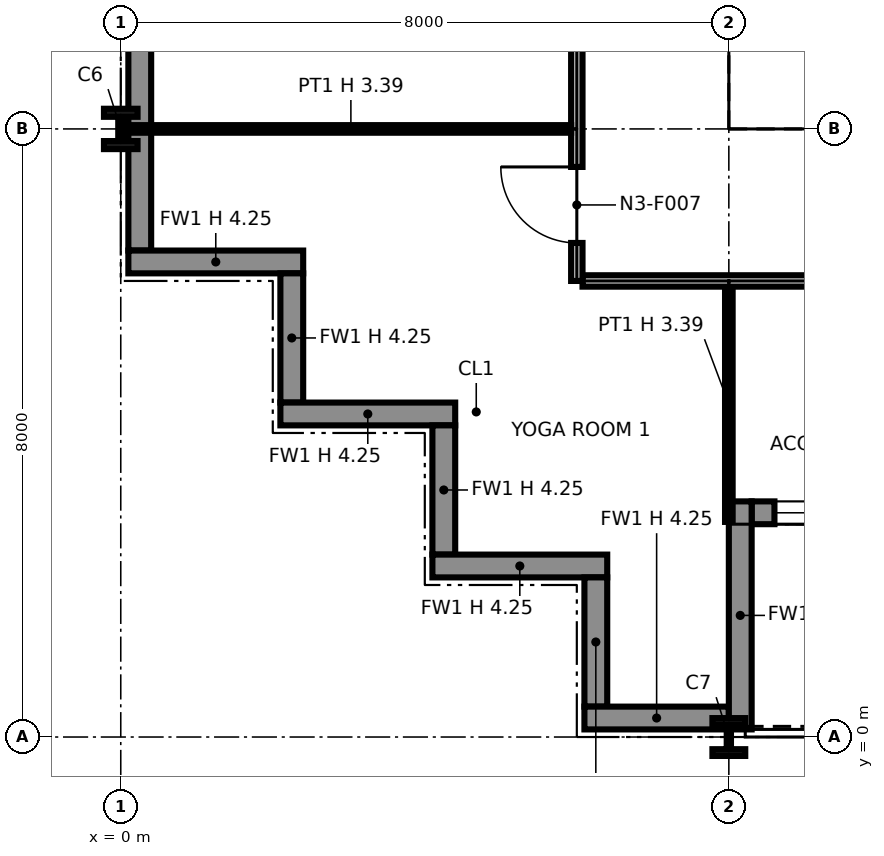
"""IFC4 building model, lengths in metres.
Left out: names, types, materials, properties, quantities, classifications, styles, units other than length and angle.
Written with IfcOpenShell. Run it as: python <this file> out.ifc"""

import sys

from ifc_helpers import new_model, si_unit, direction, frame, frame_2d, origin, origin_2d, place, context, subcontext, project, spatial, polyline, rectangle, i_section, outline, extrude, element, fill, save


model = new_model("IFC4")
c1 = context("Model", 3, precision=1e-05, world=origin(), true_north=direction((0.0, 1.0)))
c2 = subcontext(c1, "Body", "Model", "MODEL_VIEW")
j1 = project(units=[si_unit("LENGTHUNIT", "METRE"), si_unit("PLANEANGLEUNIT", "RADIAN")], contexts=[c1])
p1 = place(None, origin())
s1 = spatial("IfcSite", under=j1, at=p1, CompositionType="ELEMENT")
p2 = place(p1, origin())
s2 = spatial("IfcBuilding", under=s1, at=p2, CompositionType="ELEMENT")
p3 = place(p2, frame((0.0, 0.0, 61.2)))
s3 = spatial("IfcBuildingStorey", under=s2, at=p3, CompositionType="ELEMENT", Elevation=61.2)
p4 = place(p3, frame((0.0, 8.0, 0.0), z_axis=(0.0, 0.0, 1.0), x_axis=(1.0, 0.0, 0.0)))
e1 = element("IfcColumn", 1, at=p4, inside=s3, PredefinedType="COLUMN", context=c2, shape_type="SweptSolid", body=[
    extrude(i_section(OverallWidth=0.442, OverallDepth=0.531, WebThickness=0.066, FlangeThickness=0.106, at=origin_2d()), origin(), (0.0, 0.0, 1.0), 4.25),
])
p5 = place(p3, frame((8.0, 0.0, 0.0), z_axis=(0.0, 0.0, 1.0), x_axis=(1.0, 0.0, 0.0)))
e2 = element("IfcColumn", 2, at=p5, inside=s3, PredefinedType="COLUMN", context=c2, shape_type="SweptSolid", body=[
    extrude(i_section(OverallWidth=0.432, OverallDepth=0.498, WebThickness=0.056, FlangeThickness=0.089, at=origin_2d()), origin(), (0.0, 0.0, 1.0), 4.25),
])
p6 = place(p3, frame((8.0, 8.0, 0.0), z_axis=(0.0, 0.0, 1.0), x_axis=(1.0, 0.0, 0.0)))
e3 = element("IfcColumn", 3, at=p6, inside=s3, PredefinedType="COLUMN", context=c2, shape_type="SweptSolid", body=[
    extrude(i_section(OverallWidth=0.419, OverallDepth=0.455, WebThickness=0.042, FlangeThickness=0.068, at=origin_2d()), origin(), (0.0, 0.0, 1.0), 4.25),
])
p7 = place(p3, frame((0.25, 16.0, 0.0), z_axis=(0.0, 0.0, 1.0), x_axis=(0.0, -1.0, 0.0)))
e4 = element("IfcWall", 4, at=p7, inside=s3, PredefinedType="SOLIDWALL", context=c2, shape_type="SweptSolid", body=[
    extrude(rectangle(XDim=9.6, YDim=0.3, at=frame_2d((4.8, 0.0))), origin(), (0.0, 0.0, 1.0), 4.25),
])
p8 = place(p3, frame((0.1, 6.25, 0.0), z_axis=(0.0, 0.0, 1.0), x_axis=(1.0, 0.0, 0.0)))
e5 = element("IfcWall", 5, at=p8, inside=s3, PredefinedType="SOLIDWALL", context=c2, shape_type="SweptSolid", body=[
    extrude(rectangle(XDim=2.3, YDim=0.3, at=frame_2d((1.15, 0.0))), origin(), (0.0, 0.0, 1.0), 4.25),
])
p9 = place(p3, frame((2.25, 6.1, 0.0), z_axis=(0.0, 0.0, 1.0), x_axis=(0.0, -1.0, 0.0)))
e6 = element("IfcWall", 6, at=p9, inside=s3, PredefinedType="SOLIDWALL", context=c2, shape_type="SweptSolid", body=[
    extrude(rectangle(XDim=1.7, YDim=0.3, at=frame_2d((0.85, 0.0))), origin(), (0.0, 0.0, 1.0), 4.25),
])
p10 = place(p3, frame((2.1, 4.25, 0.0), z_axis=(0.0, 0.0, 1.0), x_axis=(1.0, 0.0, 0.0)))
e7 = element("IfcWall", 7, at=p10, inside=s3, PredefinedType="SOLIDWALL", context=c2, shape_type="SweptSolid", body=[
    extrude(rectangle(XDim=2.3, YDim=0.3, at=frame_2d((1.15, 0.0))), origin(), (0.0, 0.0, 1.0), 4.25),
])
p11 = place(p3, frame((4.25, 4.1, 0.0), z_axis=(0.0, 0.0, 1.0), x_axis=(0.0, -1.0, 0.0)))
e8 = element("IfcWall", 8, at=p11, inside=s3, PredefinedType="SOLIDWALL", context=c2, shape_type="SweptSolid", body=[
    extrude(rectangle(XDim=1.7, YDim=0.3, at=frame_2d((0.85, 0.0))), origin(), (0.0, 0.0, 1.0), 4.25),
])
p12 = place(p3, frame((4.1, 2.25, 0.0), z_axis=(0.0, 0.0, 1.0), x_axis=(1.0, 0.0, 0.0)))
e9 = element("IfcWall", 9, at=p12, inside=s3, PredefinedType="SOLIDWALL", context=c2, shape_type="SweptSolid", body=[
    extrude(rectangle(XDim=2.3, YDim=0.3, at=frame_2d((1.15, 0.0))), origin(), (0.0, 0.0, 1.0), 4.25),
])
p13 = place(p3, frame((6.25, 2.1, 0.0), z_axis=(0.0, 0.0, 1.0), x_axis=(0.0, -1.0, 0.0)))
e10 = element("IfcWall", 10, at=p13, inside=s3, PredefinedType="SOLIDWALL", context=c2, shape_type="SweptSolid", body=[
    extrude(rectangle(XDim=1.7, YDim=0.3, at=frame_2d((0.85, 0.0))), origin(), (0.0, 0.0, 1.0), 4.25),
])
p14 = place(p3, frame((6.1, 0.25, 0.0), z_axis=(0.0, 0.0, 1.0), x_axis=(1.0, 0.0, 0.0)))
e11 = element("IfcWall", 11, at=p14, inside=s3, PredefinedType="SOLIDWALL", context=c2, shape_type="SweptSolid", body=[
    extrude(rectangle(XDim=1.9, YDim=0.3, at=frame_2d((0.95, 0.0))), origin(), (0.0, 0.0, 1.0), 4.25),
])
p15 = place(p3, frame((8.3, 2.95, 0.0), z_axis=(0.0, 0.0, 1.0), x_axis=(1.0, 0.0, 0.0)))
e12 = element("IfcWall", 12, at=p15, inside=s3, PredefinedType="SOLIDWALL", context=c2, shape_type="SweptSolid", body=[
    extrude(rectangle(XDim=7.4, YDim=0.3, at=frame_2d((3.7, 0.0))), origin(), (0.0, 0.0, 1.0), 4.25),
])
p16 = place(p15, frame((0.3, 0.0, 0.9)))
e13 = element("IfcOpeningElement", 13, at=p16, cuts=e12, PredefinedType="OPENING", context=c2, shape_type="SweptSolid", body=[
    extrude(rectangle(XDim=2.8, YDim=2.2, at=frame_2d((1.4, 1.1))), frame((0.0, 0.16, 0.0), z_axis=(0.0, -1.0, 0.0), x_axis=(1.0, 0.0, 0.0)), (0.0, 0.0, 1.0), 0.32),
])
p17 = place(p15, frame((4.7, 0.0, 0.0)))
e14 = element("IfcOpeningElement", 14, at=p17, cuts=e12, PredefinedType="OPENING", context=c2, shape_type="SweptSolid", body=[
    extrude(rectangle(XDim=2.0, YDim=2.4, at=frame_2d((1.0, 1.2))), frame((0.0, 0.16, 0.0), z_axis=(0.0, -1.0, 0.0), x_axis=(1.0, 0.0, 0.0)), (0.0, 0.0, 1.0), 0.32),
])
p18 = place(p3, frame((8.15, 0.1, 0.0), z_axis=(0.0, 0.0, 1.0), x_axis=(0.0, 1.0, 0.0)))
e15 = element("IfcWall", 15, at=p18, inside=s3, PredefinedType="SOLIDWALL", context=c2, shape_type="SweptSolid", body=[
    extrude(rectangle(XDim=3.0, YDim=0.3, at=frame_2d((1.5, 0.0))), origin(), (0.0, 0.0, 1.0), 3.469),
])
p19 = place(p3, frame((8.65, 8.75, 0.0), z_axis=(0.0, 0.0, 1.0), x_axis=(1.0, 0.0, 0.0)))
e16 = element("IfcWall", 16, at=p19, inside=s3, PredefinedType="PARTITIONING", context=c2, shape_type="SweptSolid", body=[
    extrude(outline(polyline([(0.0, 0.0), (14.7, 0.0), (14.7, 4.25), (7.469, 4.25), (7.469, 3.632), (7.231, 3.632), (7.23, 4.25), (0.0, 4.25), (0.0, 0.0)])), frame((0.0, 0.1, 0.0), z_axis=(0.0, -1.0, 0.0), x_axis=(1.0, 0.0, 0.0)), (0.0, 0.0, 1.0), 0.2),
])
p20 = place(p19, frame((1.3, 0.0, 0.0)))
e17 = element("IfcOpeningElement", 17, at=p20, cuts=e16, PredefinedType="OPENING", context=c2, shape_type="SweptSolid", body=[
    extrude(rectangle(XDim=1.4, YDim=2.1, at=frame_2d((0.7, 1.05))), frame((0.0, 0.11, 0.0), z_axis=(0.0, -1.0, 0.0), x_axis=(1.0, 0.0, 0.0)), (0.0, 0.0, 1.0), 0.22),
])
p21 = place(p19, frame((4.6, 0.0, 0.0)))
e18 = element("IfcOpeningElement", 18, at=p21, cuts=e16, PredefinedType="OPENING", context=c2, shape_type="SweptSolid", body=[
    extrude(rectangle(XDim=1.4, YDim=2.1, at=frame_2d((0.7, 1.05))), frame((0.0, 0.11, 0.0), z_axis=(0.0, -1.0, 0.0), x_axis=(1.0, 0.0, 0.0)), (0.0, 0.0, 1.0), 0.22),
])
p22 = place(p19, frame((10.4, 0.0, 0.0)))
e19 = element("IfcOpeningElement", 19, at=p22, cuts=e16, PredefinedType="OPENING", context=c2, shape_type="SweptSolid", body=[
    extrude(rectangle(XDim=1.2, YDim=2.1, at=frame_2d((0.6, 1.05))), frame((0.0, 0.11, 0.0), z_axis=(0.0, -1.0, 0.0), x_axis=(1.0, 0.0, 0.0)), (0.0, 0.0, 1.0), 0.22),
])
p23 = place(p3, frame((8.75, 8.85, 0.0), z_axis=(0.0, 0.0, 1.0), x_axis=(0.0, 1.0, 0.0)))
e20 = element("IfcWall", 20, at=p23, inside=s3, PredefinedType="PARTITIONING", context=c2, shape_type="SweptSolid", body=[
    extrude(outline(polyline([(0.0, 0.0), (14.3, 0.0), (14.3, 4.25), (10.231, 4.25), (10.23, 3.789), (10.07, 3.789), (10.069, 4.25), (7.27, 4.25), (7.269, 3.632), (7.031, 3.632), (7.031, 4.25), (0.0, 4.25), (0.0, 0.0)])), frame((0.0, 0.1, 0.0), z_axis=(0.0, -1.0, 0.0), x_axis=(1.0, 0.0, 0.0)), (0.0, 0.0, 1.0), 0.2),
])
p24 = place(p23, frame((8.3, 0.0, 0.0)))
e21 = element("IfcOpeningElement", 21, at=p24, cuts=e20, PredefinedType="OPENING", context=c2, shape_type="SweptSolid", body=[
    extrude(rectangle(XDim=1.8, YDim=2.1, at=frame_2d((0.9, 1.05))), frame((0.0, 0.11, 0.0), z_axis=(0.0, -1.0, 0.0), x_axis=(1.0, 0.0, 0.0)), (0.0, 0.0, 1.0), 0.22),
])
p25 = place(p3, frame((8.0, 2.83, 0.0), z_axis=(0.0, 0.0, 1.0), x_axis=(0.0, 1.0, 0.0)))
e22 = element("IfcWall", 22, at=p25, inside=s3, PredefinedType="PARTITIONING", context=c2, shape_type="SweptSolid", body=[
    extrude(rectangle(XDim=3.095, YDim=0.1, at=frame_2d((1.547, 0.0))), origin(), (0.0, 0.0, 1.0), 3.391),
])
p26 = place(p3, frame((6.075, 6.0, 0.0), z_axis=(0.0, 0.0, 1.0), x_axis=(1.0, 0.0, 0.0)))
e23 = element("IfcWall", 23, at=p26, inside=s3, PredefinedType="PARTITIONING", context=c2, shape_type="SweptSolid", body=[
    extrude(rectangle(XDim=19.85, YDim=0.15, at=frame_2d((9.925, 0.0))), origin(), (0.0, 0.0, 1.0), 4.25),
])
p27 = place(p26, frame((12.425, 0.0, 0.0), z_axis=(0.0, 0.0, 1.0), x_axis=(-1.0, 0.0, 0.0)))
e24 = element("IfcOpeningElement", 24, at=p27, cuts=e23, PredefinedType="OPENING", context=c2, shape_type="SweptSolid", body=[
    extrude(rectangle(XDim=1.0, YDim=2.1, at=frame_2d((0.5, 1.05))), frame((0.0, 0.085, 0.0), z_axis=(0.0, -1.0, 0.0), x_axis=(1.0, 0.0, 0.0)), (0.0, 0.0, 1.0), 0.17),
])
p28 = place(p26, frame((16.425, 0.0, 0.0), z_axis=(0.0, 0.0, 1.0), x_axis=(-1.0, 0.0, 0.0)))
e25 = element("IfcOpeningElement", 25, at=p28, cuts=e23, PredefinedType="OPENING", context=c2, shape_type="SweptSolid", body=[
    extrude(rectangle(XDim=1.0, YDim=2.1, at=frame_2d((0.5, 1.05))), frame((0.0, 0.085, 0.0), z_axis=(0.0, -1.0, 0.0), x_axis=(1.0, 0.0, 0.0)), (0.0, 0.0, 1.0), 0.17),
])
p29 = place(p26, frame((4.425, 0.0, 0.0), z_axis=(0.0, 0.0, 1.0), x_axis=(-1.0, 0.0, 0.0)))
e26 = element("IfcOpeningElement", 26, at=p29, cuts=e23, PredefinedType="OPENING", context=c2, shape_type="SweptSolid", body=[
    extrude(rectangle(XDim=1.0, YDim=2.1, at=frame_2d((0.5, 1.05))), frame((0.0, 0.085, 0.0), z_axis=(0.0, -1.0, 0.0), x_axis=(1.0, 0.0, 0.0)), (0.0, 0.0, 1.0), 0.17),
])
p30 = place(p26, frame((8.425, 0.0, 0.0), z_axis=(0.0, 0.0, 1.0), x_axis=(-1.0, 0.0, 0.0)))
e27 = element("IfcOpeningElement", 27, at=p30, cuts=e23, PredefinedType="OPENING", context=c2, shape_type="SweptSolid", body=[
    extrude(rectangle(XDim=1.0, YDim=2.1, at=frame_2d((0.5, 1.05))), frame((0.0, 0.085, 0.0), z_axis=(0.0, -1.0, 0.0), x_axis=(1.0, 0.0, 0.0)), (0.0, 0.0, 1.0), 0.17),
])
p31 = place(p26, frame((19.425, 0.0, 0.0), z_axis=(0.0, 0.0, 1.0), x_axis=(-1.0, 0.0, 0.0)))
e28 = element("IfcOpeningElement", 28, at=p31, cuts=e23, PredefinedType="OPENING", context=c2, shape_type="SweptSolid", body=[
    extrude(rectangle(XDim=1.0, YDim=2.1, at=frame_2d((0.5, 1.05))), frame((0.0, 0.085, 0.0), z_axis=(0.0, -1.0, 0.0), x_axis=(1.0, 0.0, 0.0)), (0.0, 0.0, 1.0), 0.17),
])
p32 = place(p3, frame((6.0, 6.0, 0.0), z_axis=(0.0, 0.0, 1.0), x_axis=(0.0, 1.0, 0.0)))
e29 = element("IfcWall", 29, at=p32, inside=s3, PredefinedType="PARTITIONING", context=c2, shape_type="SweptSolid", body=[
    extrude(rectangle(XDim=19.925, YDim=0.15, at=frame_2d((9.962, 0.0))), origin(), (0.0, 0.0, 1.0), 3.391),
])
p33 = place(p32, frame((0.5, 0.0, 0.0)))
e30 = element("IfcOpeningElement", 30, at=p33, cuts=e29, PredefinedType="OPENING", context=c2, shape_type="SweptSolid", body=[
    extrude(rectangle(XDim=1.0, YDim=2.1, at=frame_2d((0.5, 1.05))), frame((0.0, 0.085, 0.0), z_axis=(0.0, -1.0, 0.0), x_axis=(1.0, 0.0, 0.0)), (0.0, 0.0, 1.0), 0.17),
])
p34 = place(p32, frame((3.5, 0.0, 0.0)))
e31 = element("IfcOpeningElement", 31, at=p34, cuts=e29, PredefinedType="OPENING", context=c2, shape_type="SweptSolid", body=[
    extrude(rectangle(XDim=1.0, YDim=2.1, at=frame_2d((0.5, 1.05))), frame((0.0, 0.085, 0.0), z_axis=(0.0, -1.0, 0.0), x_axis=(1.0, 0.0, 0.0)), (0.0, 0.0, 1.0), 0.17),
])
p35 = place(p32, frame((7.5, 0.0, 0.0)))
e32 = element("IfcOpeningElement", 32, at=p35, cuts=e29, PredefinedType="OPENING", context=c2, shape_type="SweptSolid", body=[
    extrude(rectangle(XDim=1.0, YDim=2.1, at=frame_2d((0.5, 1.05))), frame((0.0, 0.085, 0.0), z_axis=(0.0, -1.0, 0.0), x_axis=(1.0, 0.0, 0.0)), (0.0, 0.0, 1.0), 0.17),
])
p36 = place(p32, frame((15.225, 0.0, 0.0)))
e33 = element("IfcOpeningElement", 33, at=p36, cuts=e29, PredefinedType="OPENING", context=c2, shape_type="SweptSolid", body=[
    extrude(rectangle(XDim=1.0, YDim=2.1, at=frame_2d((0.5, 1.05))), frame((0.0, 0.085, 0.0), z_axis=(0.0, -1.0, 0.0), x_axis=(1.0, 0.0, 0.0)), (0.0, 0.0, 1.0), 0.17),
])
p37 = place(p3, frame((0.13, 8.0, 0.0), z_axis=(0.0, 0.0, 1.0), x_axis=(1.0, 0.0, 0.0)))
e34 = element("IfcWall", 34, at=p37, inside=s3, PredefinedType="PARTITIONING", context=c2, shape_type="SweptSolid", body=[
    extrude(rectangle(XDim=5.795, YDim=0.1, at=frame_2d((2.897, 0.0))), origin(), (0.0, 0.0, 1.0), 3.391),
])
p38 = place(p16, origin())
e35 = element("IfcWindow", 35, at=p38, inside=s3, PartitioningType="SINGLE_PANEL", PredefinedType="WINDOW", context=c2, shape_type="SweptSolid", body=[
    extrude(rectangle(XDim=2.8, YDim=2.2, at=frame_2d((1.4, 1.1))), frame((0.0, 0.03, 0.0), z_axis=(0.0, -1.0, 0.0), x_axis=(1.0, 0.0, 0.0)), (0.0, 0.0, 1.0), 0.06),
])
fill(e13, e35)
p39 = place(p33, origin())
e36 = element("IfcDoor", 36, at=p39, inside=s3, OperationType="SINGLE_SWING_RIGHT", PredefinedType="DOOR", context=c2, shape_type="SweptSolid", body=[
    extrude(rectangle(XDim=1.0, YDim=2.1, at=frame_2d((0.5, 1.05))), frame((0.0, 0.025, 0.0), z_axis=(0.0, -1.0, 0.0), x_axis=(1.0, 0.0, 0.0)), (0.0, 0.0, 1.0), 0.05),
])
fill(e30, e36)
save(model, sys.argv[1])
